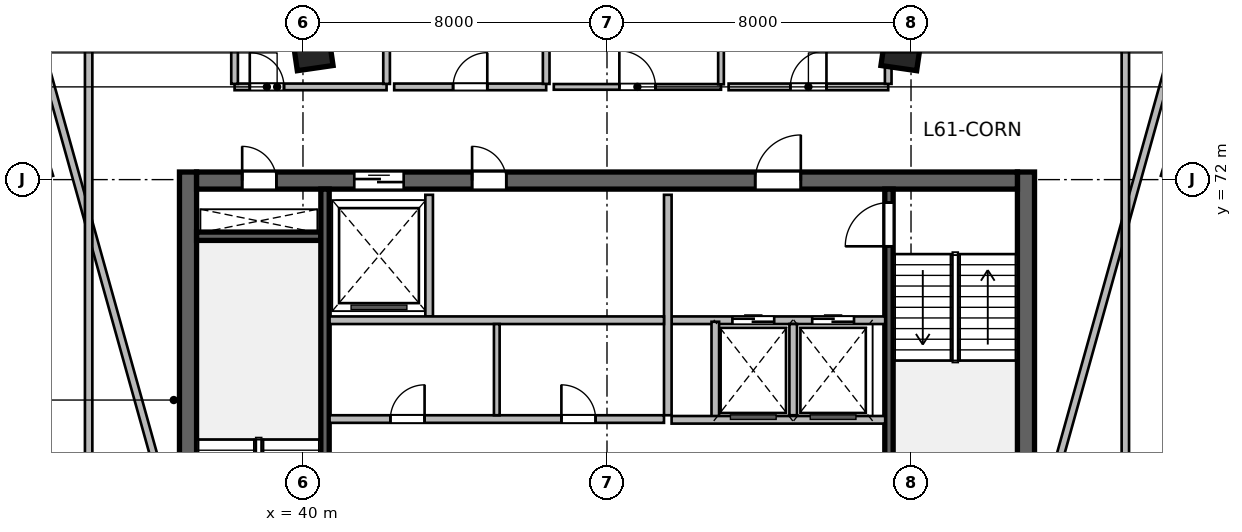
"""IFC4 building model, lengths in metres.
Left out: names, types, materials, properties, quantities, classifications, styles, units other than length and angle.
Written with IfcOpenShell. Run it as: python <this file> out.ifc"""

import sys

from ifc_helpers import new_model, si_unit, direction, frame, frame_2d, origin, origin_2d, place, context, subcontext, project, spatial, rectangle, extrude, source, transform, mapped, element, fill, save


model = new_model("IFC4")
c1 = context("Model", 3, precision=1e-05, world=origin(), true_north=direction((0.0, 1.0)))
c2 = subcontext(c1, "Body", "Model", "MODEL_VIEW")
j1 = project(units=[si_unit("LENGTHUNIT", "METRE"), si_unit("PLANEANGLEUNIT", "RADIAN")], contexts=[c1])
p1 = place(None, origin())
s1 = spatial("IfcSite", under=j1, at=p1, CompositionType="ELEMENT")
p2 = place(p1, origin())
s2 = spatial("IfcBuilding", under=s1, at=p2, CompositionType="ELEMENT")
p3 = place(p2, frame((0.0, 0.0, 250.8)))
s3 = spatial("IfcBuildingStorey", under=s2, at=p3, CompositionType="ELEMENT", Elevation=250.8)
m1 = source(origin(), c2, "Body", "SweptSolid", [
    extrude(rectangle(XDim=12.0, YDim=0.45, at=frame_2d((6.0, 0.0))), origin(), (0.0, 0.0, 1.0), 3.9),
])
for number, where, z_axis, x_axis in (
    (1, (36.975, 60.2, 0.0), (0.0, 0.0, 1.0), (0.0, 1.0, 0.0)),
    (2, (59.025, 60.2, 0.0), (0.0, 0.0, 1.0), (0.0, 1.0, 0.0)),
):
    element("IfcWall", number, at=place(p3, frame(where, z_axis=z_axis, x_axis=x_axis)), inside=s3, PredefinedType="SHEAR", context=c2, shape_type="MappedRepresentation", body=[
        mapped(m1, transform((0.0, 0.0, 0.0), scale=1.0)),
    ])
m2 = source(origin(), c2, "Body", "SweptSolid", [
    extrude(rectangle(XDim=21.6, YDim=0.45, at=frame_2d((10.8, 0.0))), origin(), (0.0, 0.0, 1.0), 3.9),
])
p4 = place(p3, frame((37.2, 71.975, 0.0), z_axis=(0.0, 0.0, 1.0), x_axis=(1.0, 0.0, 0.0)))
e3 = element("IfcWall", 3, at=p4, inside=s3, PredefinedType="SHEAR", context=c2, shape_type="MappedRepresentation", body=[
    mapped(m2, transform((0.0, 0.0, 0.0), scale=1.0)),
])
p5 = place(p4, frame((1.2, 0.0, 0.0)))
e4 = element("IfcOpeningElement", 4, at=p5, cuts=e3, PredefinedType="OPENING", context=c2, shape_type="SweptSolid", body=[
    extrude(rectangle(XDim=0.9, YDim=2.1, at=frame_2d((0.45, 1.05))), frame((0.0, 0.235, 0.0), z_axis=(0.0, -1.0, 0.0), x_axis=(1.0, 0.0, 0.0)), (0.0, 0.0, 1.0), 0.47),
])
p6 = place(p4, frame((14.7, 0.0, 0.0)))
e5 = element("IfcOpeningElement", 5, at=p6, cuts=e3, PredefinedType="OPENING", context=c2, shape_type="SweptSolid", body=[
    extrude(rectangle(XDim=1.2, YDim=2.15, at=frame_2d((0.6, 1.075))), frame((0.0, 0.235, 0.0), z_axis=(0.0, -1.0, 0.0), x_axis=(1.0, 0.0, 0.0)), (0.0, 0.0, 1.0), 0.47),
])
p7 = place(p4, frame((4.15, 0.0, 0.0)))
e6 = element("IfcOpeningElement", 6, at=p7, cuts=e3, PredefinedType="OPENING", context=c2, shape_type="SweptSolid", body=[
    extrude(rectangle(XDim=1.3, YDim=2.15, at=frame_2d((0.65, 1.075))), frame((0.0, 0.235, 0.0), z_axis=(0.0, -1.0, 0.0), x_axis=(1.0, 0.0, 0.0)), (0.0, 0.0, 1.0), 0.47),
])
p8 = place(p4, frame((7.25, 0.0, 0.0)))
e7 = element("IfcOpeningElement", 7, at=p8, cuts=e3, PredefinedType="OPENING", context=c2, shape_type="SweptSolid", body=[
    extrude(rectangle(XDim=0.9, YDim=2.1, at=frame_2d((0.45, 1.05))), frame((0.0, 0.235, 0.0), z_axis=(0.0, -1.0, 0.0), x_axis=(1.0, 0.0, 0.0)), (0.0, 0.0, 1.0), 0.47),
])
m3 = source(origin(), c2, "Body", "SweptSolid", [
    extrude(rectangle(XDim=3.27, YDim=0.22, at=frame_2d((1.635, 0.0))), origin(), (0.0, 0.0, 1.0), 3.9),
])
p9 = place(p3, frame((37.2, 70.51, 0.0), z_axis=(0.0, 0.0, 1.0), x_axis=(1.0, 0.0, 0.0)))
e8 = element("IfcWall", 8, at=p9, inside=s3, PredefinedType="SHEAR", context=c2, shape_type="MappedRepresentation", body=[
    mapped(m3, transform((0.0, 0.0, 0.0), scale=1.0)),
])
m4 = source(origin(), c2, "Body", "SweptSolid", [
    extrude(rectangle(XDim=11.1, YDim=0.22, at=frame_2d((5.55, 0.0))), origin(), (0.0, 0.0, 1.0), 3.9),
])
p10 = place(p3, frame((40.58, 60.65, 0.0), z_axis=(0.0, 0.0, 1.0), x_axis=(0.0, 1.0, 0.0)))
e9 = element("IfcWall", 9, at=p10, inside=s3, PredefinedType="SHEAR", context=c2, shape_type="MappedRepresentation", body=[
    mapped(m4, transform((0.0, 0.0, 0.0), scale=1.0)),
])
p11 = place(p3, frame((55.42, 60.65, 0.0), z_axis=(0.0, 0.0, 1.0), x_axis=(0.0, 1.0, 0.0)))
e10 = element("IfcWall", 10, at=p11, inside=s3, PredefinedType="SHEAR", context=c2, shape_type="MappedRepresentation", body=[
    mapped(m4, transform((0.0, 0.0, 0.0), scale=1.0)),
])
p12 = place(p11, frame((9.595, 0.0, 0.0)))
e11 = element("IfcOpeningElement", 11, at=p12, cuts=e10, PredefinedType="OPENING", context=c2, shape_type="SweptSolid", body=[
    extrude(rectangle(XDim=1.15, YDim=2.15, at=frame_2d((0.575, 1.075))), frame((0.0, 0.12, 0.0), z_axis=(0.0, -1.0, 0.0), x_axis=(1.0, 0.0, 0.0)), (0.0, 0.0, 1.0), 0.24),
])
m5 = source(origin(), c2, "Body", "SweptSolid", [
    extrude(rectangle(XDim=0.95, YDim=0.95, at=origin_2d()), origin(), (0.0, 0.0, 1.0), 3.9),
])
for number, where, z_axis, x_axis in (
    (12, (40.253, 75.404, 0.0), (0.0, 0.0, 1.0), (-0.143, 0.99, 0.0)),
    (13, (55.747, 75.404, 0.0), (0.0, 0.0, 1.0), (0.143, 0.99, 0.0)),
):
    element("IfcColumn", number, at=place(p3, frame(where, z_axis=z_axis, x_axis=x_axis)), inside=s3, PredefinedType="COLUMN", context=c2, shape_type="MappedRepresentation", body=[
        mapped(m5, transform((0.0, 0.0, 0.0), scale=1.0)),
    ])
m6 = source(origin(), c2, "Body", "SweptSolid", [
    extrude(rectangle(XDim=5.62, YDim=0.2, at=frame_2d((2.81, 0.0))), origin(), (0.0, 0.0, 1.0), 3.58),
])
p13 = place(p3, frame((49.7, 68.3, 0.0), z_axis=(0.0, 0.0, 1.0), x_axis=(1.0, 0.0, 0.0)))
e14 = element("IfcWall", 14, at=p13, inside=s3, PredefinedType="SOLIDWALL", context=c2, shape_type="MappedRepresentation", body=[
    mapped(m6, transform((0.0, 0.0, 0.0), scale=1.0)),
])
p14 = place(p13, frame((1.6, 0.0, 0.0)))
e15 = element("IfcOpeningElement", 15, at=p14, cuts=e14, PredefinedType="OPENING", context=c2, shape_type="SweptSolid", body=[
    extrude(rectangle(XDim=1.1, YDim=2.15, at=frame_2d((0.55, 1.075))), frame((0.0, 0.11, 0.0), z_axis=(0.0, -1.0, 0.0), x_axis=(1.0, 0.0, 0.0)), (0.0, 0.0, 1.0), 0.22),
])
p15 = place(p13, frame((3.7, 0.0, 0.0)))
e16 = element("IfcOpeningElement", 16, at=p15, cuts=e14, PredefinedType="OPENING", context=c2, shape_type="SweptSolid", body=[
    extrude(rectangle(XDim=1.1, YDim=2.15, at=frame_2d((0.55, 1.075))), frame((0.0, 0.11, 0.0), z_axis=(0.0, -1.0, 0.0), x_axis=(1.0, 0.0, 0.0)), (0.0, 0.0, 1.0), 0.22),
])
m7 = source(origin(), c2, "Body", "SweptSolid", [
    extrude(rectangle(XDim=5.8, YDim=0.2, at=frame_2d((2.9, 0.0))), origin(), (0.0, 0.0, 1.0), 3.58),
])
p16 = place(p3, frame((49.6, 65.8, 0.0), z_axis=(0.0, 0.0, 1.0), x_axis=(0.0, 1.0, 0.0)))
e17 = element("IfcWall", 17, at=p16, inside=s3, PredefinedType="SOLIDWALL", context=c2, shape_type="MappedRepresentation", body=[
    mapped(m7, transform((0.0, 0.0, 0.0), scale=1.0)),
])
m8 = source(origin(), c2, "Body", "SweptSolid", [
    extrude(rectangle(XDim=2.58, YDim=0.2, at=frame_2d((1.29, 0.0))), origin(), (0.0, 0.0, 1.0), 3.58),
])
p17 = place(p3, frame((50.85, 65.68, 0.0), z_axis=(0.0, 0.0, 1.0), x_axis=(0.0, 1.0, 0.0)))
e18 = element("IfcWall", 18, at=p17, inside=s3, PredefinedType="SOLIDWALL", context=c2, shape_type="MappedRepresentation", body=[
    mapped(m8, transform((0.0, 0.0, 0.0), scale=1.0)),
])
m9 = source(origin(), c2, "Body", "SweptSolid", [
    extrude(rectangle(XDim=2.4, YDim=0.2, at=frame_2d((1.2, 0.0))), origin(), (0.0, 0.0, 1.0), 3.58),
])
p18 = place(p3, frame((52.9, 65.8, 0.0), z_axis=(0.0, 0.0, 1.0), x_axis=(0.0, 1.0, 0.0)))
e19 = element("IfcWall", 19, at=p18, inside=s3, PredefinedType="SOLIDWALL", context=c2, shape_type="MappedRepresentation", body=[
    mapped(m9, transform((0.0, 0.0, 0.0), scale=1.0)),
])
p19 = place(p3, frame((49.7, 65.68, 0.0), z_axis=(0.0, 0.0, 1.0), x_axis=(1.0, 0.0, 0.0)))
e20 = element("IfcWall", 20, at=p19, inside=s3, PredefinedType="SOLIDWALL", context=c2, shape_type="MappedRepresentation", body=[
    mapped(m6, transform((0.0, 0.0, 0.0), scale=1.0)),
])
m10 = source(origin(), c2, "Body", "SweptSolid", [
    extrude(rectangle(XDim=3.2, YDim=0.2, at=frame_2d((1.6, 0.0))), origin(), (0.0, 0.0, 1.0), 3.58),
])
p20 = place(p3, frame((43.32, 68.4, 0.0), z_axis=(0.0, 0.0, 1.0), x_axis=(0.0, 1.0, 0.0)))
e21 = element("IfcWall", 21, at=p20, inside=s3, PredefinedType="SOLIDWALL", context=c2, shape_type="MappedRepresentation", body=[
    mapped(m10, transform((0.0, 0.0, 0.0), scale=1.0)),
])
m11 = source(origin(), c2, "Body", "SweptSolid", [
    extrude(rectangle(XDim=8.8, YDim=0.2, at=frame_2d((4.4, 0.0))), origin(), (0.0, 0.0, 1.0), 3.58),
])
p21 = place(p3, frame((40.7, 68.3, 0.0), z_axis=(0.0, 0.0, 1.0), x_axis=(1.0, 0.0, 0.0)))
e22 = element("IfcWall", 22, at=p21, inside=s3, PredefinedType="SOLIDWALL", context=c2, shape_type="MappedRepresentation", body=[
    mapped(m11, transform((0.0, 0.0, 0.0), scale=1.0)),
])
p22 = place(p3, frame((40.7, 65.7, 0.0), z_axis=(0.0, 0.0, 1.0), x_axis=(1.0, 0.0, 0.0)))
e23 = element("IfcWall", 23, at=p22, inside=s3, PredefinedType="SOLIDWALL", context=c2, shape_type="MappedRepresentation", body=[
    mapped(m11, transform((0.0, 0.0, 0.0), scale=1.0)),
])
p23 = place(p22, frame((1.6, 0.0, 0.0)))
e24 = element("IfcOpeningElement", 24, at=p23, cuts=e23, PredefinedType="OPENING", context=c2, shape_type="SweptSolid", body=[
    extrude(rectangle(XDim=0.9, YDim=2.1, at=frame_2d((0.45, 1.05))), frame((0.0, 0.11, 0.0), z_axis=(0.0, -1.0, 0.0), x_axis=(1.0, 0.0, 0.0)), (0.0, 0.0, 1.0), 0.22),
])
p24 = place(p22, frame((6.1, 0.0, 0.0)))
e25 = element("IfcOpeningElement", 25, at=p24, cuts=e23, PredefinedType="OPENING", context=c2, shape_type="SweptSolid", body=[
    extrude(rectangle(XDim=0.9, YDim=2.1, at=frame_2d((0.45, 1.05))), frame((0.0, 0.11, 0.0), z_axis=(0.0, -1.0, 0.0), x_axis=(1.0, 0.0, 0.0)), (0.0, 0.0, 1.0), 0.22),
])
m12 = source(origin(), c2, "Body", "SweptSolid", [
    extrude(rectangle(XDim=2.4, YDim=0.15, at=frame_2d((1.2, 0.0))), origin(), (0.0, 0.0, 1.0), 3.58),
])
p25 = place(p3, frame((45.1, 65.8, 0.0), z_axis=(0.0, 0.0, 1.0), x_axis=(0.0, 1.0, 0.0)))
e26 = element("IfcWall", 26, at=p25, inside=s3, PredefinedType="PARTITIONING", context=c2, shape_type="MappedRepresentation", body=[
    mapped(m12, transform((0.0, 0.0, 0.0), scale=1.0)),
])
m13 = source(origin(), c2, "Body", "SweptSolid", [
    extrude(rectangle(XDim=4.0, YDim=0.175, at=frame_2d((2.0, 0.0))), origin(), (0.0, 0.0, 1.0), 3.58),
])
p26 = place(p3, frame((38.2, 74.44, 0.0), z_axis=(0.0, 0.0, 1.0), x_axis=(1.0, 0.0, 0.0)))
e27 = element("IfcWall", 27, at=p26, inside=s3, PredefinedType="PARTITIONING", context=c2, shape_type="MappedRepresentation", body=[
    mapped(m13, transform((0.0, 0.0, 0.0), scale=1.0)),
])
p27 = place(p26, frame((0.4, 0.0, 0.0)))
e28 = element("IfcOpeningElement", 28, at=p27, cuts=e27, PredefinedType="OPENING", context=c2, shape_type="SweptSolid", body=[
    extrude(rectangle(XDim=0.9, YDim=2.08, at=frame_2d((0.45, 1.04))), frame((0.0, 0.098, 0.0), z_axis=(0.0, -1.0, 0.0), x_axis=(1.0, 0.0, 0.0)), (0.0, 0.0, 1.0), 0.195),
])
m14 = source(origin(), c2, "Body", "SweptSolid", [
    extrude(rectangle(XDim=2.403, YDim=0.175, at=frame_2d((1.201, 0.0))), origin(), (0.0, 0.0, 1.0), 3.58),
])
for number, where, z_axis, x_axis in (
    (29, (38.2, 74.519, 0.0), (0.0, 0.0, 1.0), (0.0, 1.0, 0.0)),
    (30, (42.2, 74.519, 0.0), (0.0, 0.0, 1.0), (0.0, 1.0, 0.0)),
):
    element("IfcWall", number, at=place(p3, frame(where, z_axis=z_axis, x_axis=x_axis)), inside=s3, PredefinedType="PARTITIONING", context=c2, shape_type="MappedRepresentation", body=[
        mapped(m14, transform((0.0, 0.0, 0.0), scale=1.0)),
    ])
p28 = place(p3, frame((42.4, 74.44, 0.0), z_axis=(0.0, 0.0, 1.0), x_axis=(1.0, 0.0, 0.0)))
e31 = element("IfcWall", 31, at=p28, inside=s3, PredefinedType="PARTITIONING", context=c2, shape_type="MappedRepresentation", body=[
    mapped(m13, transform((0.0, 0.0, 0.0), scale=1.0)),
])
p29 = place(p28, frame((1.55, 0.0, 0.0)))
e32 = element("IfcOpeningElement", 32, at=p29, cuts=e31, PredefinedType="OPENING", context=c2, shape_type="SweptSolid", body=[
    extrude(rectangle(XDim=0.9, YDim=2.08, at=frame_2d((0.45, 1.04))), frame((0.0, 0.098, 0.0), z_axis=(0.0, -1.0, 0.0), x_axis=(1.0, 0.0, 0.0)), (0.0, 0.0, 1.0), 0.195),
])
p30 = place(p3, frame((46.4, 74.519, 0.0), z_axis=(0.0, 0.0, 1.0), x_axis=(0.0, 1.0, 0.0)))
e33 = element("IfcWall", 33, at=p30, inside=s3, PredefinedType="PARTITIONING", context=c2, shape_type="MappedRepresentation", body=[
    mapped(m14, transform((0.0, 0.0, 0.0), scale=1.0)),
])
m15 = source(origin(), c2, "Body", "SweptSolid", [
    extrude(rectangle(XDim=4.4, YDim=0.15, at=frame_2d((2.2, 0.0))), origin(), (0.0, 0.0, 1.0), 3.58),
])
p31 = place(p3, frame((46.6, 74.44, 0.0), z_axis=(0.0, 0.0, 1.0), x_axis=(1.0, 0.0, 0.0)))
e34 = element("IfcWall", 34, at=p31, inside=s3, PredefinedType="PARTITIONING", context=c2, shape_type="MappedRepresentation", body=[
    mapped(m15, transform((0.0, 0.0, 0.0), scale=1.0)),
])
p32 = place(p31, frame((1.725, 0.0, 0.0)))
e35 = element("IfcOpeningElement", 35, at=p32, cuts=e34, PredefinedType="OPENING", context=c2, shape_type="SweptSolid", body=[
    extrude(rectangle(XDim=0.95, YDim=2.1, at=frame_2d((0.475, 1.05))), frame((0.0, 0.085, 0.0), z_axis=(0.0, -1.0, 0.0), x_axis=(1.0, 0.0, 0.0)), (0.0, 0.0, 1.0), 0.17),
])
m16 = source(origin(), c2, "Body", "SweptSolid", [
    extrude(rectangle(XDim=2.425, YDim=0.15, at=frame_2d((1.212, 0.0))), origin(), (0.0, 0.0, 1.0), 3.58),
])
p33 = place(p3, frame((51.0, 74.508, 0.0), z_axis=(0.0, 0.0, 1.0), x_axis=(0.0, 1.0, 0.0)))
e36 = element("IfcWall", 36, at=p33, inside=s3, PredefinedType="PARTITIONING", context=c2, shape_type="MappedRepresentation", body=[
    mapped(m16, transform((0.0, 0.0, 0.0), scale=1.0)),
])
m17 = source(origin(), c2, "Body", "SweptSolid", [
    extrude(rectangle(XDim=4.2, YDim=0.175, at=frame_2d((2.1, 0.0))), origin(), (0.0, 0.0, 1.0), 3.58),
])
p34 = place(p3, frame((51.2, 74.44, 0.0), z_axis=(0.0, 0.0, 1.0), x_axis=(1.0, 0.0, 0.0)))
e37 = element("IfcWall", 37, at=p34, inside=s3, PredefinedType="PARTITIONING", context=c2, shape_type="MappedRepresentation", body=[
    mapped(m17, transform((0.0, 0.0, 0.0), scale=1.0)),
])
p35 = place(p34, frame((1.625, 0.0, 0.0)))
e38 = element("IfcOpeningElement", 38, at=p35, cuts=e37, PredefinedType="OPENING", context=c2, shape_type="SweptSolid", body=[
    extrude(rectangle(XDim=0.95, YDim=2.12, at=frame_2d((0.475, 1.06))), frame((0.0, 0.098, 0.0), z_axis=(0.0, -1.0, 0.0), x_axis=(1.0, 0.0, 0.0)), (0.0, 0.0, 1.0), 0.195),
])
p36 = place(p3, frame((55.4, 74.519, 0.0), z_axis=(0.0, 0.0, 1.0), x_axis=(0.0, 1.0, 0.0)))
e39 = element("IfcWall", 39, at=p36, inside=s3, PredefinedType="PARTITIONING", context=c2, shape_type="MappedRepresentation", body=[
    mapped(m14, transform((0.0, 0.0, 0.0), scale=1.0)),
])
m18 = source(origin(), c2, "Body", "SweptSolid", [
    extrude(rectangle(XDim=13.169, YDim=0.195, at=frame_2d((6.585, 0.0))), origin(), (0.0, 0.0, 1.0), 3.58),
])
p37 = place(p3, frame((36.5, 63.216, 0.0), z_axis=(0.0, 0.0, 1.0), x_axis=(-0.26875376985, 0.963208913576, 0.0)))
e40 = element("IfcWall", 40, at=p37, inside=s3, PredefinedType="PARTITIONING", context=c2, shape_type="MappedRepresentation", body=[
    mapped(m18, transform((0.0, 0.0, 0.0), scale=1.0)),
])
m19 = source(origin(), c2, "Body", "SweptSolid", [
    extrude(rectangle(XDim=18.567, YDim=0.195, at=frame_2d((9.284, 0.0))), origin(), (0.0, 0.0, 1.0), 3.58),
])
p38 = place(p3, frame((34.36, 57.96, 0.0), z_axis=(0.0, 0.0, 1.0), x_axis=(0.0, 1.0, 0.0)))
e41 = element("IfcWall", 41, at=p38, inside=s3, PredefinedType="PARTITIONING", context=c2, shape_type="MappedRepresentation", body=[
    mapped(m19, transform((0.0, 0.0, 0.0), scale=1.0)),
])
m20 = source(origin(), c2, "Body", "SweptSolid", [
    extrude(rectangle(XDim=13.161, YDim=0.195, at=frame_2d((6.581, 0.0))), origin(), (0.0, 0.0, 1.0), 3.58),
])
p39 = place(p3, frame((59.5, 63.216, 0.0), z_axis=(0.0, 0.0, 1.0), x_axis=(0.268752541286, 0.963209256368, 0.0)))
e42 = element("IfcWall", 42, at=p39, inside=s3, PredefinedType="PARTITIONING", context=c2, shape_type="MappedRepresentation", body=[
    mapped(m20, transform((0.0, 0.0, 0.0), scale=1.0)),
])
m21 = source(origin(), c2, "Body", "SweptSolid", [
    extrude(rectangle(XDim=18.471, YDim=0.195, at=frame_2d((9.235, 0.0))), origin(), (0.0, 0.0, 1.0), 3.58),
])
p40 = place(p3, frame((61.333, 55.602, 0.0), z_axis=(0.0, 0.0, 1.0), x_axis=(0.368827756565, 0.929497760076, 0.0)))
e43 = element("IfcWall", 43, at=p40, inside=s3, PredefinedType="PARTITIONING", context=c2, shape_type="MappedRepresentation", body=[
    mapped(m21, transform((0.0, 0.0, 0.0), scale=1.0)),
])
m22 = source(origin(), c2, "Body", "SweptSolid", [
    extrude(rectangle(XDim=18.567, YDim=0.195, at=frame_2d((9.284, 0.0))), origin(), (0.0, 0.0, 1.0), 3.58),
])
p41 = place(p3, frame((61.64, 57.96, 0.0), z_axis=(0.0, 0.0, 1.0), x_axis=(0.0, 1.0, 0.0)))
e44 = element("IfcWall", 44, at=p41, inside=s3, PredefinedType="PARTITIONING", context=c2, shape_type="MappedRepresentation", body=[
    mapped(m22, transform((0.0, 0.0, 0.0), scale=1.0)),
])
m23 = source(origin(), c2, "Body", "SweptSolid", [
    extrude(rectangle(XDim=0.9, YDim=2.1, at=frame_2d((0.45, 1.05))), frame((0.0, 0.025, 0.0), z_axis=(0.0, -1.0, 0.0), x_axis=(1.0, 0.0, 0.0)), (0.0, 0.0, 1.0), 0.05),
])
p42 = place(p5, origin())
e45 = element("IfcDoor", 45, at=p42, inside=s3, OperationType="SINGLE_SWING_LEFT", PredefinedType="DOOR", context=c2, shape_type="MappedRepresentation", body=[
    mapped(m23, transform((0.0, 0.0, 0.0), scale=1.0)),
])
fill(e4, e45)
m24 = source(origin(), c2, "Body", "SweptSolid", [
    extrude(rectangle(XDim=1.15, YDim=2.15, at=frame_2d((0.575, 1.075))), frame((0.0, 0.025, 0.0), z_axis=(0.0, -1.0, 0.0), x_axis=(1.0, 0.0, 0.0)), (0.0, 0.0, 1.0), 0.05),
])
p43 = place(p12, origin())
e46 = element("IfcDoor", 46, at=p43, inside=s3, OperationType="SINGLE_SWING_LEFT", PredefinedType="DOOR", context=c2, shape_type="MappedRepresentation", body=[
    mapped(m24, transform((0.0, 0.0, 0.0), scale=1.0)),
])
fill(e11, e46)
m25 = source(origin(), c2, "Body", "SweptSolid", [
    extrude(rectangle(XDim=1.2, YDim=2.15, at=frame_2d((0.6, 1.075))), frame((0.0, 0.025, 0.0), z_axis=(0.0, -1.0, 0.0), x_axis=(1.0, 0.0, 0.0)), (0.0, 0.0, 1.0), 0.05),
])
p44 = place(p6, origin())
e47 = element("IfcDoor", 47, at=p44, inside=s3, OperationType="SINGLE_SWING_RIGHT", PredefinedType="DOOR", context=c2, shape_type="MappedRepresentation", body=[
    mapped(m25, transform((0.0, 0.0, 0.0), scale=1.0)),
])
fill(e5, e47)
m26 = source(origin(), c2, "Body", "SweptSolid", [
    extrude(rectangle(XDim=1.1, YDim=2.15, at=frame_2d((0.55, 1.075))), frame((0.0, 0.025, 0.0), z_axis=(0.0, -1.0, 0.0), x_axis=(1.0, 0.0, 0.0)), (0.0, 0.0, 1.0), 0.05),
])
p45 = place(p14, origin())
e48 = element("IfcDoor", 48, at=p45, inside=s3, OperationType="DOUBLE_DOOR_SLIDING", PredefinedType="DOOR", context=c2, shape_type="MappedRepresentation", body=[
    mapped(m26, transform((0.0, 0.0, 0.0), scale=1.0)),
])
fill(e15, e48)
p46 = place(p15, origin())
e49 = element("IfcDoor", 49, at=p46, inside=s3, OperationType="DOUBLE_DOOR_SLIDING", PredefinedType="DOOR", context=c2, shape_type="MappedRepresentation", body=[
    mapped(m26, transform((0.0, 0.0, 0.0), scale=1.0)),
])
fill(e16, e49)
m27 = source(origin(), c2, "Body", "SweptSolid", [
    extrude(rectangle(XDim=1.3, YDim=2.15, at=frame_2d((0.65, 1.075))), frame((0.0, 0.025, 0.0), z_axis=(0.0, -1.0, 0.0), x_axis=(1.0, 0.0, 0.0)), (0.0, 0.0, 1.0), 0.05),
])
p47 = place(p7, origin())
e50 = element("IfcDoor", 50, at=p47, inside=s3, OperationType="DOUBLE_DOOR_SLIDING", PredefinedType="DOOR", context=c2, shape_type="MappedRepresentation", body=[
    mapped(m27, transform((0.0, 0.0, 0.0), scale=1.0)),
])
fill(e6, e50)
p48 = place(p8, origin())
e51 = element("IfcDoor", 51, at=p48, inside=s3, OperationType="SINGLE_SWING_LEFT", PredefinedType="DOOR", context=c2, shape_type="MappedRepresentation", body=[
    mapped(m23, transform((0.0, 0.0, 0.0), scale=1.0)),
])
fill(e7, e51)
p49 = place(p23, origin())
e52 = element("IfcDoor", 52, at=p49, inside=s3, OperationType="SINGLE_SWING_RIGHT", PredefinedType="DOOR", context=c2, shape_type="MappedRepresentation", body=[
    mapped(m23, transform((0.0, 0.0, 0.0), scale=1.0)),
])
fill(e24, e52)
p50 = place(p24, origin())
e53 = element("IfcDoor", 53, at=p50, inside=s3, OperationType="SINGLE_SWING_LEFT", PredefinedType="DOOR", context=c2, shape_type="MappedRepresentation", body=[
    mapped(m23, transform((0.0, 0.0, 0.0), scale=1.0)),
])
fill(e25, e53)
m28 = source(origin(), c2, "Body", "SweptSolid", [
    extrude(rectangle(XDim=0.9, YDim=2.08, at=frame_2d((0.45, 1.04))), frame((0.0, 0.025, 0.0), z_axis=(0.0, -1.0, 0.0), x_axis=(1.0, 0.0, 0.0)), (0.0, 0.0, 1.0), 0.05),
])
p51 = place(p27, origin())
e54 = element("IfcDoor", 54, at=p51, inside=s3, OperationType="SINGLE_SWING_LEFT", PredefinedType="DOOR", context=c2, shape_type="MappedRepresentation", body=[
    mapped(m28, transform((0.0, 0.0, 0.0), scale=1.0)),
])
fill(e28, e54)
p52 = place(p29, origin())
e55 = element("IfcDoor", 55, at=p52, inside=s3, OperationType="SINGLE_SWING_RIGHT", PredefinedType="DOOR", context=c2, shape_type="MappedRepresentation", body=[
    mapped(m28, transform((0.0, 0.0, 0.0), scale=1.0)),
])
fill(e32, e55)
m29 = source(origin(), c2, "Body", "SweptSolid", [
    extrude(rectangle(XDim=0.95, YDim=2.1, at=frame_2d((0.475, 1.05))), frame((0.0, 0.025, 0.0), z_axis=(0.0, -1.0, 0.0), x_axis=(1.0, 0.0, 0.0)), (0.0, 0.0, 1.0), 0.05),
])
p53 = place(p32, origin())
e56 = element("IfcDoor", 56, at=p53, inside=s3, OperationType="SINGLE_SWING_LEFT", PredefinedType="DOOR", context=c2, shape_type="MappedRepresentation", body=[
    mapped(m29, transform((0.0, 0.0, 0.0), scale=1.0)),
])
fill(e35, e56)
m30 = source(origin(), c2, "Body", "SweptSolid", [
    extrude(rectangle(XDim=0.95, YDim=2.12, at=frame_2d((0.475, 1.06))), frame((0.0, 0.025, 0.0), z_axis=(0.0, -1.0, 0.0), x_axis=(1.0, 0.0, 0.0)), (0.0, 0.0, 1.0), 0.05),
])
p54 = place(p35, origin())
e57 = element("IfcDoor", 57, at=p54, inside=s3, OperationType="SINGLE_SWING_RIGHT", PredefinedType="DOOR", context=c2, shape_type="MappedRepresentation", body=[
    mapped(m30, transform((0.0, 0.0, 0.0), scale=1.0)),
])
fill(e38, e57)
save(model, sys.argv[1])
